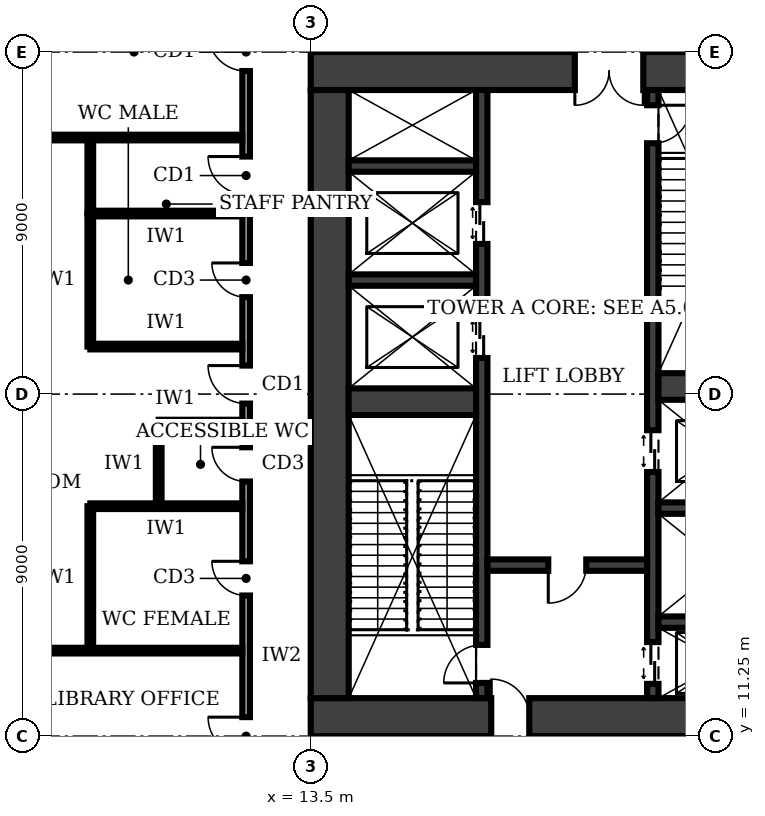
"""IFC4 building model, lengths in metres.
Left out: names, types, materials, properties, quantities, classifications, styles, units other than length and angle.
Written with IfcOpenShell. Run it as: python <this file> out.ifc"""

import sys

from ifc_helpers import new_model, si_unit, direction, frame, frame_2d, origin, place, context, subcontext, project, spatial, rectangle, extrude, element, fill, save


model = new_model("IFC4")
c1 = context("Model", 3, precision=1e-05, world=origin(), true_north=direction((0.0, 1.0)))
c2 = subcontext(c1, "Body", "Model", "MODEL_VIEW")
j1 = project(units=[si_unit("LENGTHUNIT", "METRE"), si_unit("PLANEANGLEUNIT", "RADIAN")], contexts=[c1])
p1 = place(None, origin())
s1 = spatial("IfcSite", under=j1, at=p1, CompositionType="ELEMENT")
p2 = place(p1, origin())
s2 = spatial("IfcBuilding", under=s1, at=p2, CompositionType="ELEMENT")
p3 = place(p2, frame((0.0, 0.0, 11.0)))
s3 = spatial("IfcBuildingStorey", under=s2, at=p3, CompositionType="ELEMENT", Elevation=11.0)
p4 = place(p3, frame((13.5, 11.75, 0.0), z_axis=(0.0, 0.0, 1.0), x_axis=(1.0, 0.0, 0.0)))
e1 = element("IfcWall", 1, at=p4, inside=s3, PredefinedType="SHEAR", context=c2, shape_type="SweptSolid", body=[
    extrude(rectangle(XDim=13.5, YDim=1.0, at=frame_2d((6.75, 0.0))), origin(), (0.0, 0.0, 1.0), 5.0),
])
p5 = place(p4, frame((4.75, 0.0, 0.0)))
e2 = element("IfcOpeningElement", 2, at=p5, cuts=e1, PredefinedType="OPENING", context=c2, shape_type="SweptSolid", body=[
    extrude(rectangle(XDim=1.0, YDim=2.1, at=frame_2d((0.5, 1.05))), frame((0.0, 0.51, 0.0), z_axis=(0.0, -1.0, 0.0), x_axis=(1.0, 0.0, 0.0)), (0.0, 0.0, 1.0), 1.02),
])
p6 = place(p3, frame((27.0, 28.75, 0.0), z_axis=(0.0, 0.0, 1.0), x_axis=(-1.0, 0.0, 0.0)))
e3 = element("IfcWall", 3, at=p6, inside=s3, PredefinedType="SHEAR", context=c2, shape_type="SweptSolid", body=[
    extrude(rectangle(XDim=13.5, YDim=1.0, at=frame_2d((6.75, 0.0))), origin(), (0.0, 0.0, 1.0), 5.0),
])
p7 = place(p6, frame((4.75, 0.0, 0.0)))
e4 = element("IfcOpeningElement", 4, at=p7, cuts=e3, PredefinedType="OPENING", context=c2, shape_type="SweptSolid", body=[
    extrude(rectangle(XDim=1.8, YDim=2.1, at=frame_2d((0.9, 1.05))), frame((0.0, 0.51, 0.0), z_axis=(0.0, -1.0, 0.0), x_axis=(1.0, 0.0, 0.0)), (0.0, 0.0, 1.0), 1.02),
])
p8 = place(p3, frame((14.0, 28.25, 0.0), z_axis=(0.0, 0.0, 1.0), x_axis=(0.0, -1.0, 0.0)))
e5 = element("IfcWall", 5, at=p8, inside=s3, PredefinedType="SHEAR", context=c2, shape_type="SweptSolid", body=[
    extrude(rectangle(XDim=16.0, YDim=1.0, at=frame_2d((8.0, 0.0))), origin(), (0.0, 0.0, 1.0), 5.0),
])
p9 = place(p3, frame((18.0, 12.25, 0.0), z_axis=(0.0, 0.0, 1.0), x_axis=(0.0, 1.0, 0.0)))
e6 = element("IfcWall", 6, at=p9, inside=s3, PredefinedType="SHEAR", context=c2, shape_type="SweptSolid", body=[
    extrude(rectangle(XDim=16.0, YDim=0.3, at=frame_2d((8.0, 0.0))), origin(), (0.0, 0.0, 1.0), 5.0),
])
p10 = place(p9, frame((0.4, 0.0, 0.0)))
e7 = element("IfcOpeningElement", 7, at=p10, cuts=e6, PredefinedType="OPENING", context=c2, shape_type="SweptSolid", body=[
    extrude(rectangle(XDim=1.0, YDim=2.1, at=frame_2d((0.5, 1.05))), frame((0.0, 0.16, 0.0), z_axis=(0.0, -1.0, 0.0), x_axis=(1.0, 0.0, 0.0)), (0.0, 0.0, 1.0), 0.32),
])
p11 = place(p9, frame((8.95, 0.0, 0.0)))
e8 = element("IfcOpeningElement", 8, at=p11, cuts=e6, PredefinedType="OPENING", context=c2, shape_type="SweptSolid", body=[
    extrude(rectangle(XDim=1.1, YDim=2.1, at=frame_2d((0.55, 1.05))), frame((0.0, 0.16, 0.0), z_axis=(0.0, -1.0, 0.0), x_axis=(1.0, 0.0, 0.0)), (0.0, 0.0, 1.0), 0.32),
])
p12 = place(p9, frame((11.95, 0.0, 0.0)))
e9 = element("IfcOpeningElement", 9, at=p12, cuts=e6, PredefinedType="OPENING", context=c2, shape_type="SweptSolid", body=[
    extrude(rectangle(XDim=1.1, YDim=2.1, at=frame_2d((0.55, 1.05))), frame((0.0, 0.16, 0.0), z_axis=(0.0, -1.0, 0.0), x_axis=(1.0, 0.0, 0.0)), (0.0, 0.0, 1.0), 0.32),
])
p13 = place(p3, frame((22.5, 12.25, 0.0), z_axis=(0.0, 0.0, 1.0), x_axis=(0.0, 1.0, 0.0)))
e10 = element("IfcWall", 10, at=p13, inside=s3, PredefinedType="SHEAR", context=c2, shape_type="SweptSolid", body=[
    extrude(rectangle(XDim=16.0, YDim=0.3, at=frame_2d((8.0, 0.0))), origin(), (0.0, 0.0, 1.0), 5.0),
])
p14 = place(p13, frame((14.6, 0.0, 0.0)))
e11 = element("IfcOpeningElement", 11, at=p14, cuts=e10, PredefinedType="OPENING", context=c2, shape_type="SweptSolid", body=[
    extrude(rectangle(XDim=1.0, YDim=2.1, at=frame_2d((0.5, 1.05))), frame((0.0, 0.16, 0.0), z_axis=(0.0, -1.0, 0.0), x_axis=(1.0, 0.0, 0.0)), (0.0, 0.0, 1.0), 0.32),
])
p15 = place(p13, frame((0.375, 0.0, 0.0)))
e12 = element("IfcOpeningElement", 12, at=p15, cuts=e10, PredefinedType="OPENING", context=c2, shape_type="SweptSolid", body=[
    extrude(rectangle(XDim=1.1, YDim=2.1, at=frame_2d((0.55, 1.05))), frame((0.0, 0.16, 0.0), z_axis=(0.0, -1.0, 0.0), x_axis=(1.0, 0.0, 0.0)), (0.0, 0.0, 1.0), 0.32),
])
p16 = place(p13, frame((5.95, 0.0, 0.0)))
e13 = element("IfcOpeningElement", 13, at=p16, cuts=e10, PredefinedType="OPENING", context=c2, shape_type="SweptSolid", body=[
    extrude(rectangle(XDim=1.1, YDim=2.1, at=frame_2d((0.55, 1.05))), frame((0.0, 0.16, 0.0), z_axis=(0.0, -1.0, 0.0), x_axis=(1.0, 0.0, 0.0)), (0.0, 0.0, 1.0), 0.32),
])
p17 = place(p3, frame((14.5, 20.05, 0.0), z_axis=(0.0, 0.0, 1.0), x_axis=(1.0, 0.0, 0.0)))
e14 = element("IfcWall", 14, at=p17, inside=s3, PredefinedType="SHEAR", context=c2, shape_type="SweptSolid", body=[
    extrude(rectangle(XDim=3.35, YDim=0.7, at=frame_2d((1.675, 0.0))), origin(), (0.0, 0.0, 1.0), 5.0),
])
p18 = place(p3, frame((18.15, 15.75, 0.0), z_axis=(0.0, 0.0, 1.0), x_axis=(1.0, 0.0, 0.0)))
e15 = element("IfcWall", 15, at=p18, inside=s3, PredefinedType="SHEAR", context=c2, shape_type="SweptSolid", body=[
    extrude(rectangle(XDim=4.2, YDim=0.3, at=frame_2d((2.1, 0.0))), origin(), (0.0, 0.0, 1.0), 5.0),
])
p19 = place(p18, frame((1.6, 0.0, 0.0)))
e16 = element("IfcOpeningElement", 16, at=p19, cuts=e15, PredefinedType="OPENING", context=c2, shape_type="SweptSolid", body=[
    extrude(rectangle(XDim=1.0, YDim=2.1, at=frame_2d((0.5, 1.05))), frame((0.0, 0.16, 0.0), z_axis=(0.0, -1.0, 0.0), x_axis=(1.0, 0.0, 0.0)), (0.0, 0.0, 1.0), 0.32),
])
for number, where, z_axis, x_axis in (
    (17, (22.65, 14.25, 0.0), (0.0, 0.0, 1.0), (1.0, 0.0, 0.0)),
    (18, (22.65, 17.25, 0.0), (0.0, 0.0, 1.0), (1.0, 0.0, 0.0)),
):
    element("IfcWall", number, at=place(p3, frame(where, z_axis=z_axis, x_axis=x_axis)), inside=s3, PredefinedType="SHEAR", context=c2, shape_type="SweptSolid", body=[
        extrude(rectangle(XDim=3.35, YDim=0.3, at=frame_2d((1.675, 0.0))), origin(), (0.0, 0.0, 1.0), 5.0),
    ])
p20 = place(p3, frame((22.65, 20.45, 0.0), z_axis=(0.0, 0.0, 1.0), x_axis=(1.0, 0.0, 0.0)))
e19 = element("IfcWall", 19, at=p20, inside=s3, PredefinedType="SHEAR", context=c2, shape_type="SweptSolid", body=[
    extrude(rectangle(XDim=3.35, YDim=0.7, at=frame_2d((1.675, 0.0))), origin(), (0.0, 0.0, 1.0), 5.0),
])
for number, where, z_axis, x_axis in (
    (20, (14.5, 23.25, 0.0), (0.0, 0.0, 1.0), (1.0, 0.0, 0.0)),
    (21, (14.5, 26.25, 0.0), (0.0, 0.0, 1.0), (1.0, 0.0, 0.0)),
):
    element("IfcWall", number, at=place(p3, frame(where, z_axis=z_axis, x_axis=x_axis)), inside=s3, PredefinedType="SHEAR", context=c2, shape_type="SweptSolid", body=[
        extrude(rectangle(XDim=3.35, YDim=0.3, at=frame_2d((1.675, 0.0))), origin(), (0.0, 0.0, 1.0), 5.0),
    ])
p21 = place(p3, frame((11.8, 31.3, 0.0), z_axis=(0.0, 0.0, 1.0), x_axis=(0.0, -1.0, 0.0)))
e22 = element("IfcWall", 22, at=p21, inside=s3, PredefinedType="SOLIDWALL", context=c2, shape_type="SweptSolid", body=[
    extrude(rectangle(XDim=22.3, YDim=0.2, at=frame_2d((11.15, 0.0))), origin(), (0.0, 0.0, 1.0), 4.7),
])
p22 = place(p21, frame((19.55, 0.0, 0.0)))
e23 = element("IfcOpeningElement", 23, at=p22, cuts=e22, PredefinedType="OPENING", context=c2, shape_type="SweptSolid", body=[
    extrude(rectangle(XDim=1.0, YDim=2.1, at=frame_2d((0.5, 1.05))), frame((0.0, 0.11, 0.0), z_axis=(0.0, -1.0, 0.0), x_axis=(1.0, 0.0, 0.0)), (0.0, 0.0, 1.0), 0.22),
])
p23 = place(p21, frame((15.45, 0.0, 0.0)))
e24 = element("IfcOpeningElement", 24, at=p23, cuts=e22, PredefinedType="OPENING", context=c2, shape_type="SweptSolid", body=[
    extrude(rectangle(XDim=0.9, YDim=2.1, at=frame_2d((0.45, 1.05))), frame((0.0, 0.11, 0.0), z_axis=(0.0, -1.0, 0.0), x_axis=(1.0, 0.0, 0.0)), (0.0, 0.0, 1.0), 0.22),
])
p24 = place(p21, frame((12.45, 0.0, 0.0)))
e25 = element("IfcOpeningElement", 25, at=p24, cuts=e22, PredefinedType="OPENING", context=c2, shape_type="SweptSolid", body=[
    extrude(rectangle(XDim=0.9, YDim=2.1, at=frame_2d((0.45, 1.05))), frame((0.0, 0.11, 0.0), z_axis=(0.0, -1.0, 0.0), x_axis=(1.0, 0.0, 0.0)), (0.0, 0.0, 1.0), 0.22),
])
p25 = place(p21, frame((7.6, 0.0, 0.0)))
e26 = element("IfcOpeningElement", 26, at=p25, cuts=e22, PredefinedType="OPENING", context=c2, shape_type="SweptSolid", body=[
    extrude(rectangle(XDim=0.9, YDim=2.1, at=frame_2d((0.45, 1.05))), frame((0.0, 0.11, 0.0), z_axis=(0.0, -1.0, 0.0), x_axis=(1.0, 0.0, 0.0)), (0.0, 0.0, 1.0), 0.22),
])
p26 = place(p21, frame((4.8, 0.0, 0.0)))
e27 = element("IfcOpeningElement", 27, at=p26, cuts=e22, PredefinedType="OPENING", context=c2, shape_type="SweptSolid", body=[
    extrude(rectangle(XDim=1.0, YDim=2.1, at=frame_2d((0.5, 1.05))), frame((0.0, 0.11, 0.0), z_axis=(0.0, -1.0, 0.0), x_axis=(1.0, 0.0, 0.0)), (0.0, 0.0, 1.0), 0.22),
])
p27 = place(p21, frame((10.3, 0.0, 0.0)))
e28 = element("IfcOpeningElement", 28, at=p27, cuts=e22, PredefinedType="OPENING", context=c2, shape_type="SweptSolid", body=[
    extrude(rectangle(XDim=1.0, YDim=2.1, at=frame_2d((0.5, 1.05))), frame((0.0, 0.11, 0.0), z_axis=(0.0, -1.0, 0.0), x_axis=(1.0, 0.0, 0.0)), (0.0, 0.0, 1.0), 0.22),
])
p28 = place(p21, frame((1.55, 0.0, 0.0)))
e29 = element("IfcOpeningElement", 29, at=p28, cuts=e22, PredefinedType="OPENING", context=c2, shape_type="SweptSolid", body=[
    extrude(rectangle(XDim=1.0, YDim=2.1, at=frame_2d((0.5, 1.05))), frame((0.0, 0.11, 0.0), z_axis=(0.0, -1.0, 0.0), x_axis=(1.0, 0.0, 0.0)), (0.0, 0.0, 1.0), 0.22),
])
for number, where, z_axis, x_axis in (
    (30, (0.3, 13.5, 0.0), (0.0, 0.0, 1.0), (1.0, 0.0, 0.0)),
    (31, (0.3, 27.0, 0.0), (0.0, 0.0, 1.0), (1.0, 0.0, 0.0)),
):
    element("IfcWall", number, at=place(p3, frame(where, z_axis=z_axis, x_axis=x_axis)), inside=s3, PredefinedType="PARTITIONING", context=c2, shape_type="SweptSolid", body=[
        extrude(rectangle(XDim=11.4, YDim=0.15, at=frame_2d((5.7, 0.0))), origin(), (0.0, 0.0, 1.0), 4.7),
    ])
p29 = place(p3, frame((11.7, 17.3, 0.0), z_axis=(0.0, 0.0, 1.0), x_axis=(-1.0, 0.0, 0.0)))
e32 = element("IfcWall", 32, at=p29, inside=s3, PredefinedType="PARTITIONING", context=c2, shape_type="SweptSolid", body=[
    extrude(rectangle(XDim=4.0, YDim=0.15, at=frame_2d((2.0, 0.0))), origin(), (0.0, 0.0, 1.0), 4.7),
])
p30 = place(p3, frame((11.7, 19.5, 0.0), z_axis=(0.0, 0.0, 1.0), x_axis=(-1.0, 0.0, 0.0)))
e33 = element("IfcWall", 33, at=p30, inside=s3, PredefinedType="PARTITIONING", context=c2, shape_type="SweptSolid", body=[
    extrude(rectangle(XDim=2.2, YDim=0.15, at=frame_2d((1.1, 0.0))), origin(), (0.0, 0.0, 1.0), 4.7),
])
for number, where, z_axis, x_axis in (
    (34, (11.7, 21.5, 0.0), (0.0, 0.0, 1.0), (-1.0, 0.0, 0.0)),
    (35, (11.7, 25.0, 0.0), (0.0, 0.0, 1.0), (-1.0, 0.0, 0.0)),
):
    element("IfcWall", number, at=place(p3, frame(where, z_axis=z_axis, x_axis=x_axis)), inside=s3, PredefinedType="PARTITIONING", context=c2, shape_type="SweptSolid", body=[
        extrude(rectangle(XDim=4.0, YDim=0.15, at=frame_2d((2.0, 0.0))), origin(), (0.0, 0.0, 1.0), 4.7),
    ])
p31 = place(p3, frame((7.7, 13.5, 0.0), z_axis=(0.0, 0.0, 1.0), x_axis=(0.0, 1.0, 0.0)))
e36 = element("IfcWall", 36, at=p31, inside=s3, PredefinedType="PARTITIONING", context=c2, shape_type="SweptSolid", body=[
    extrude(rectangle(XDim=3.8, YDim=0.15, at=frame_2d((1.9, 0.0))), origin(), (0.0, 0.0, 1.0), 4.7),
])
p32 = place(p3, frame((9.5, 17.3, 0.0), z_axis=(0.0, 0.0, 1.0), x_axis=(0.0, 1.0, 0.0)))
e37 = element("IfcWall", 37, at=p32, inside=s3, PredefinedType="PARTITIONING", context=c2, shape_type="SweptSolid", body=[
    extrude(rectangle(XDim=2.2, YDim=0.15, at=frame_2d((1.1, 0.0))), origin(), (0.0, 0.0, 1.0), 4.7),
])
p33 = place(p3, frame((7.7, 21.5, 0.0), z_axis=(0.0, 0.0, 1.0), x_axis=(0.0, 1.0, 0.0)))
e38 = element("IfcWall", 38, at=p33, inside=s3, PredefinedType="PARTITIONING", context=c2, shape_type="SweptSolid", body=[
    extrude(rectangle(XDim=3.5, YDim=0.15, at=frame_2d((1.75, 0.0))), origin(), (0.0, 0.0, 1.0), 4.7),
])
p34 = place(p3, frame((7.7, 25.0, 0.0), z_axis=(0.0, 0.0, 1.0), x_axis=(0.0, 1.0, 0.0)))
e39 = element("IfcWall", 39, at=p34, inside=s3, PredefinedType="PARTITIONING", context=c2, shape_type="SweptSolid", body=[
    extrude(rectangle(XDim=2.0, YDim=0.15, at=frame_2d((1.0, 0.0))), origin(), (0.0, 0.0, 1.0), 4.7),
])
p35 = place(p5, origin())
e40 = element("IfcDoor", 40, at=p35, inside=s3, OperationType="SINGLE_SWING_LEFT", PredefinedType="DOOR", context=c2, shape_type="SweptSolid", body=[
    extrude(rectangle(XDim=1.0, YDim=2.1, at=frame_2d((0.5, 1.05))), frame((0.0, 0.025, 0.0), z_axis=(0.0, -1.0, 0.0), x_axis=(1.0, 0.0, 0.0)), (0.0, 0.0, 1.0), 0.05),
])
fill(e2, e40)
p36 = place(p7, origin())
e41 = element("IfcDoor", 41, at=p36, inside=s3, OperationType="DOUBLE_DOOR_SINGLE_SWING", PredefinedType="DOOR", context=c2, shape_type="SweptSolid", body=[
    extrude(rectangle(XDim=1.8, YDim=2.1, at=frame_2d((0.9, 1.05))), frame((0.0, 0.025, 0.0), z_axis=(0.0, -1.0, 0.0), x_axis=(1.0, 0.0, 0.0)), (0.0, 0.0, 1.0), 0.05),
])
fill(e4, e41)
p37 = place(p19, frame((1.0, 0.0, 0.0), z_axis=(0.0, 0.0, 1.0), x_axis=(-1.0, 0.0, 0.0)))
e42 = element("IfcDoor", 42, at=p37, inside=s3, OperationType="SINGLE_SWING_RIGHT", PredefinedType="DOOR", context=c2, shape_type="SweptSolid", body=[
    extrude(rectangle(XDim=1.0, YDim=2.1, at=frame_2d((0.5, 1.05))), frame((0.0, 0.025, 0.0), z_axis=(0.0, -1.0, 0.0), x_axis=(1.0, 0.0, 0.0)), (0.0, 0.0, 1.0), 0.05),
])
fill(e16, e42)
p38 = place(p10, origin())
e43 = element("IfcDoor", 43, at=p38, inside=s3, OperationType="SINGLE_SWING_LEFT", PredefinedType="DOOR", context=c2, shape_type="SweptSolid", body=[
    extrude(rectangle(XDim=1.0, YDim=2.1, at=frame_2d((0.5, 1.05))), frame((0.0, 0.025, 0.0), z_axis=(0.0, -1.0, 0.0), x_axis=(1.0, 0.0, 0.0)), (0.0, 0.0, 1.0), 0.05),
])
fill(e7, e43)
p39 = place(p14, frame((1.0, 0.0, 0.0), z_axis=(0.0, 0.0, 1.0), x_axis=(-1.0, 0.0, 0.0)))
e44 = element("IfcDoor", 44, at=p39, inside=s3, OperationType="SINGLE_SWING_LEFT", PredefinedType="DOOR", context=c2, shape_type="SweptSolid", body=[
    extrude(rectangle(XDim=1.0, YDim=2.1, at=frame_2d((0.5, 1.05))), frame((0.0, 0.025, 0.0), z_axis=(0.0, -1.0, 0.0), x_axis=(1.0, 0.0, 0.0)), (0.0, 0.0, 1.0), 0.05),
])
fill(e11, e44)
p40 = place(p15, origin())
e45 = element("IfcDoor", 45, at=p40, inside=s3, OperationType="DOUBLE_DOOR_SLIDING", PredefinedType="DOOR", context=c2, shape_type="SweptSolid", body=[
    extrude(rectangle(XDim=1.1, YDim=2.1, at=frame_2d((0.55, 1.05))), frame((0.0, 0.025, 0.0), z_axis=(0.0, -1.0, 0.0), x_axis=(1.0, 0.0, 0.0)), (0.0, 0.0, 1.0), 0.05),
])
fill(e12, e45)
p41 = place(p11, origin())
e46 = element("IfcDoor", 46, at=p41, inside=s3, OperationType="DOUBLE_DOOR_SLIDING", PredefinedType="DOOR", context=c2, shape_type="SweptSolid", body=[
    extrude(rectangle(XDim=1.1, YDim=2.1, at=frame_2d((0.55, 1.05))), frame((0.0, 0.025, 0.0), z_axis=(0.0, -1.0, 0.0), x_axis=(1.0, 0.0, 0.0)), (0.0, 0.0, 1.0), 0.05),
])
fill(e8, e46)
p42 = place(p12, origin())
e47 = element("IfcDoor", 47, at=p42, inside=s3, OperationType="DOUBLE_DOOR_SLIDING", PredefinedType="DOOR", context=c2, shape_type="SweptSolid", body=[
    extrude(rectangle(XDim=1.1, YDim=2.1, at=frame_2d((0.55, 1.05))), frame((0.0, 0.025, 0.0), z_axis=(0.0, -1.0, 0.0), x_axis=(1.0, 0.0, 0.0)), (0.0, 0.0, 1.0), 0.05),
])
fill(e9, e47)
p43 = place(p16, origin())
e48 = element("IfcDoor", 48, at=p43, inside=s3, OperationType="DOUBLE_DOOR_SLIDING", PredefinedType="DOOR", context=c2, shape_type="SweptSolid", body=[
    extrude(rectangle(XDim=1.1, YDim=2.1, at=frame_2d((0.55, 1.05))), frame((0.0, 0.025, 0.0), z_axis=(0.0, -1.0, 0.0), x_axis=(1.0, 0.0, 0.0)), (0.0, 0.0, 1.0), 0.05),
])
fill(e13, e48)
p44 = place(p22, frame((1.0, 0.0, 0.0), z_axis=(0.0, 0.0, 1.0), x_axis=(-1.0, 0.0, 0.0)))
e49 = element("IfcDoor", 49, at=p44, inside=s3, OperationType="SINGLE_SWING_RIGHT", PredefinedType="DOOR", context=c2, shape_type="SweptSolid", body=[
    extrude(rectangle(XDim=1.0, YDim=2.1, at=frame_2d((0.5, 1.05))), frame((0.0, 0.025, 0.0), z_axis=(0.0, -1.0, 0.0), x_axis=(1.0, 0.0, 0.0)), (0.0, 0.0, 1.0), 0.05),
])
fill(e23, e49)
p45 = place(p23, frame((0.9, 0.0, 0.0), z_axis=(0.0, 0.0, 1.0), x_axis=(-1.0, 0.0, 0.0)))
e50 = element("IfcDoor", 50, at=p45, inside=s3, OperationType="SINGLE_SWING_RIGHT", PredefinedType="DOOR", context=c2, shape_type="SweptSolid", body=[
    extrude(rectangle(XDim=0.9, YDim=2.1, at=frame_2d((0.45, 1.05))), frame((0.0, 0.025, 0.0), z_axis=(0.0, -1.0, 0.0), x_axis=(1.0, 0.0, 0.0)), (0.0, 0.0, 1.0), 0.05),
])
fill(e24, e50)
p46 = place(p24, frame((0.9, 0.0, 0.0), z_axis=(0.0, 0.0, 1.0), x_axis=(-1.0, 0.0, 0.0)))
e51 = element("IfcDoor", 51, at=p46, inside=s3, OperationType="SINGLE_SWING_RIGHT", PredefinedType="DOOR", context=c2, shape_type="SweptSolid", body=[
    extrude(rectangle(XDim=0.9, YDim=2.1, at=frame_2d((0.45, 1.05))), frame((0.0, 0.025, 0.0), z_axis=(0.0, -1.0, 0.0), x_axis=(1.0, 0.0, 0.0)), (0.0, 0.0, 1.0), 0.05),
])
fill(e25, e51)
p47 = place(p25, frame((0.9, 0.0, 0.0), z_axis=(0.0, 0.0, 1.0), x_axis=(-1.0, 0.0, 0.0)))
e52 = element("IfcDoor", 52, at=p47, inside=s3, OperationType="SINGLE_SWING_RIGHT", PredefinedType="DOOR", context=c2, shape_type="SweptSolid", body=[
    extrude(rectangle(XDim=0.9, YDim=2.1, at=frame_2d((0.45, 1.05))), frame((0.0, 0.025, 0.0), z_axis=(0.0, -1.0, 0.0), x_axis=(1.0, 0.0, 0.0)), (0.0, 0.0, 1.0), 0.05),
])
fill(e26, e52)
p48 = place(p26, frame((1.0, 0.0, 0.0), z_axis=(0.0, 0.0, 1.0), x_axis=(-1.0, 0.0, 0.0)))
e53 = element("IfcDoor", 53, at=p48, inside=s3, OperationType="SINGLE_SWING_RIGHT", PredefinedType="DOOR", context=c2, shape_type="SweptSolid", body=[
    extrude(rectangle(XDim=1.0, YDim=2.1, at=frame_2d((0.5, 1.05))), frame((0.0, 0.025, 0.0), z_axis=(0.0, -1.0, 0.0), x_axis=(1.0, 0.0, 0.0)), (0.0, 0.0, 1.0), 0.05),
])
fill(e27, e53)
p49 = place(p27, frame((1.0, 0.0, 0.0), z_axis=(0.0, 0.0, 1.0), x_axis=(-1.0, 0.0, 0.0)))
e54 = element("IfcDoor", 54, at=p49, inside=s3, OperationType="SINGLE_SWING_RIGHT", PredefinedType="DOOR", context=c2, shape_type="SweptSolid", body=[
    extrude(rectangle(XDim=1.0, YDim=2.1, at=frame_2d((0.5, 1.05))), frame((0.0, 0.025, 0.0), z_axis=(0.0, -1.0, 0.0), x_axis=(1.0, 0.0, 0.0)), (0.0, 0.0, 1.0), 0.05),
])
fill(e28, e54)
p50 = place(p28, frame((1.0, 0.0, 0.0), z_axis=(0.0, 0.0, 1.0), x_axis=(-1.0, 0.0, 0.0)))
e55 = element("IfcDoor", 55, at=p50, inside=s3, OperationType="SINGLE_SWING_RIGHT", PredefinedType="DOOR", context=c2, shape_type="SweptSolid", body=[
    extrude(rectangle(XDim=1.0, YDim=2.1, at=frame_2d((0.5, 1.05))), frame((0.0, 0.025, 0.0), z_axis=(0.0, -1.0, 0.0), x_axis=(1.0, 0.0, 0.0)), (0.0, 0.0, 1.0), 0.05),
])
fill(e29, e55)
save(model, sys.argv[1])
